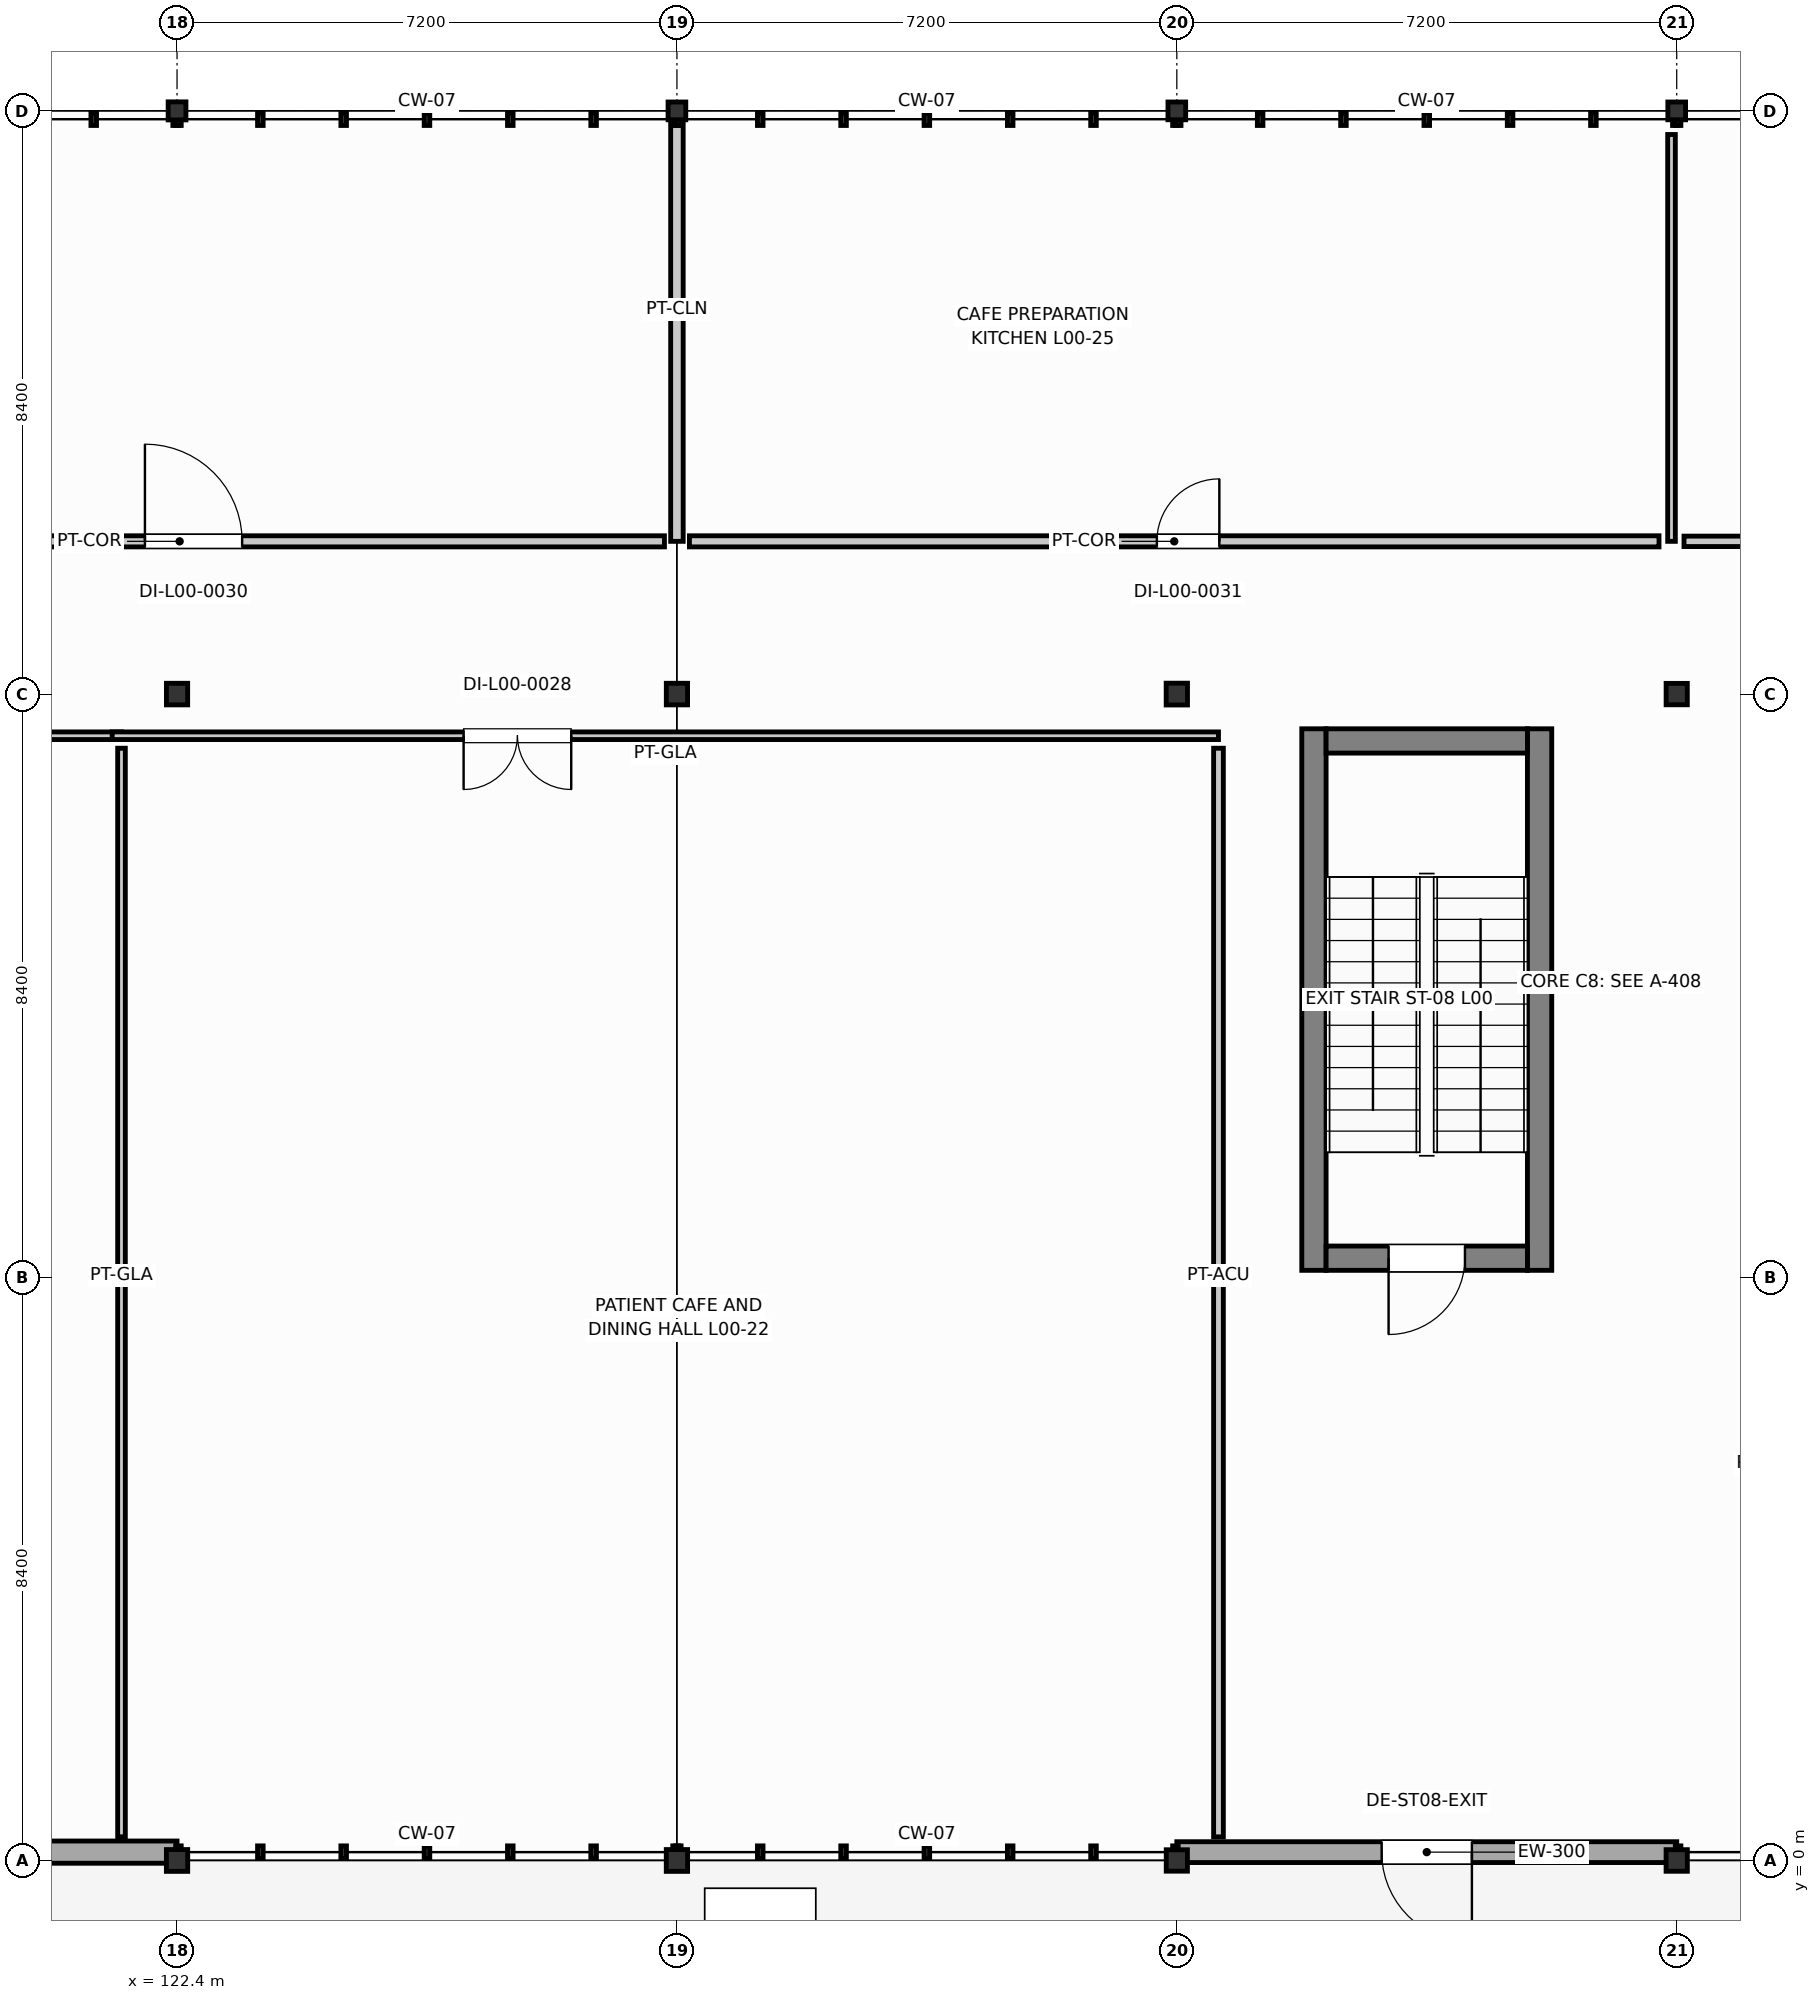
"""IFC4 building model, lengths in metres.
Left out: names, types, materials, properties, quantities, classifications, styles, units other than length and angle.
Written with IfcOpenShell. Run it as: python <this file> out.ifc"""

import sys

from ifc_helpers import new_model, si_unit, direction, frame, frame_2d, origin, origin_2d, place, context, subcontext, project, spatial, rectangle, i_section, extrude, element, fill, save


model = new_model("IFC4")
c1 = context("Model", 3, precision=1e-05, world=origin(), true_north=direction((0.0, 1.0)))
c2 = subcontext(c1, "Body", "Model", "MODEL_VIEW")
j1 = project(units=[si_unit("LENGTHUNIT", "METRE"), si_unit("PLANEANGLEUNIT", "RADIAN")], contexts=[c1])
p1 = place(None, origin())
s1 = spatial("IfcSite", under=j1, at=p1, CompositionType="ELEMENT")
p2 = place(p1, origin())
s2 = spatial("IfcBuilding", under=s1, at=p2, CompositionType="ELEMENT")
p3 = place(p2, origin())
s3 = spatial("IfcBuildingStorey", under=s2, at=p3, CompositionType="ELEMENT", Elevation=0.0)
p4 = place(p3, frame((122.4, 0.0, 0.0), z_axis=(0.0, 0.0, 1.0), x_axis=(1.0, 0.0, 0.0)))
e1 = element("IfcColumn", 1, at=p4, inside=s3, PredefinedType="COLUMN", context=c2, shape_type="SweptSolid", body=[
    extrude(i_section(OverallWidth=0.307, OverallDepth=0.314, WebThickness=0.012, FlangeThickness=0.019, FilletRadius=0.016, at=origin_2d()), origin(), (0.0, 0.0, 1.0), 4.8),
])
p5 = place(p3, frame((122.4, 16.8, 0.0), z_axis=(0.0, 0.0, 1.0), x_axis=(1.0, 0.0, 0.0)))
e2 = element("IfcColumn", 2, at=p5, inside=s3, PredefinedType="COLUMN", context=c2, shape_type="SweptSolid", body=[
    extrude(i_section(OverallWidth=0.306, OverallDepth=0.311, WebThickness=0.011, FlangeThickness=0.017, FilletRadius=0.015, at=origin_2d()), origin(), (0.0, 0.0, 1.0), 4.8),
])
p6 = place(p3, frame((122.4, 25.2, 0.0), z_axis=(0.0, 0.0, 1.0), x_axis=(1.0, 0.0, 0.0)))
e3 = element("IfcColumn", 3, at=p6, inside=s3, PredefinedType="COLUMN", context=c2, shape_type="SweptSolid", body=[
    extrude(i_section(OverallWidth=0.256, OverallDepth=0.26, WebThickness=0.011, FlangeThickness=0.017, FilletRadius=0.013, at=origin_2d()), origin(), (0.0, 0.0, 1.0), 4.8),
])
p7 = place(p3, frame((129.6, 0.0, 0.0), z_axis=(0.0, 0.0, 1.0), x_axis=(1.0, 0.0, 0.0)))
e4 = element("IfcColumn", 4, at=p7, inside=s3, PredefinedType="COLUMN", context=c2, shape_type="SweptSolid", body=[
    extrude(i_section(OverallWidth=0.307, OverallDepth=0.314, WebThickness=0.012, FlangeThickness=0.019, FilletRadius=0.016, at=origin_2d()), origin(), (0.0, 0.0, 1.0), 4.8),
])
p8 = place(p3, frame((129.6, 16.8, 0.0), z_axis=(0.0, 0.0, 1.0), x_axis=(1.0, 0.0, 0.0)))
e5 = element("IfcColumn", 5, at=p8, inside=s3, PredefinedType="COLUMN", context=c2, shape_type="SweptSolid", body=[
    extrude(i_section(OverallWidth=0.306, OverallDepth=0.311, WebThickness=0.011, FlangeThickness=0.017, FilletRadius=0.015, at=origin_2d()), origin(), (0.0, 0.0, 1.0), 4.8),
])
p9 = place(p3, frame((129.6, 25.2, 0.0), z_axis=(0.0, 0.0, 1.0), x_axis=(1.0, 0.0, 0.0)))
e6 = element("IfcColumn", 6, at=p9, inside=s3, PredefinedType="COLUMN", context=c2, shape_type="SweptSolid", body=[
    extrude(i_section(OverallWidth=0.255, OverallDepth=0.256, WebThickness=0.01, FlangeThickness=0.016, FilletRadius=0.013, at=origin_2d()), origin(), (0.0, 0.0, 1.0), 4.8),
])
p10 = place(p3, frame((136.8, 0.0, 0.0), z_axis=(0.0, 0.0, 1.0), x_axis=(1.0, 0.0, 0.0)))
e7 = element("IfcColumn", 7, at=p10, inside=s3, PredefinedType="COLUMN", context=c2, shape_type="SweptSolid", body=[
    extrude(i_section(OverallWidth=0.305, OverallDepth=0.308, WebThickness=0.01, FlangeThickness=0.015, FilletRadius=0.015, at=origin_2d()), origin(), (0.0, 0.0, 1.0), 4.8),
])
p11 = place(p3, frame((136.8, 16.8, 0.0), z_axis=(0.0, 0.0, 1.0), x_axis=(1.0, 0.0, 0.0)))
e8 = element("IfcColumn", 8, at=p11, inside=s3, PredefinedType="COLUMN", context=c2, shape_type="SweptSolid", body=[
    extrude(i_section(OverallWidth=0.307, OverallDepth=0.314, WebThickness=0.012, FlangeThickness=0.019, FilletRadius=0.016, at=origin_2d()), origin(), (0.0, 0.0, 1.0), 4.8),
])
p12 = place(p3, frame((136.8, 25.2, 0.0), z_axis=(0.0, 0.0, 1.0), x_axis=(1.0, 0.0, 0.0)))
e9 = element("IfcColumn", 9, at=p12, inside=s3, PredefinedType="COLUMN", context=c2, shape_type="SweptSolid", body=[
    extrude(i_section(OverallWidth=0.255, OverallDepth=0.256, WebThickness=0.01, FlangeThickness=0.016, FilletRadius=0.013, at=origin_2d()), origin(), (0.0, 0.0, 1.0), 4.8),
])
p13 = place(p3, frame((144.0, 0.0, 0.0), z_axis=(0.0, 0.0, 1.0), x_axis=(1.0, 0.0, 0.0)))
e10 = element("IfcColumn", 10, at=p13, inside=s3, PredefinedType="COLUMN", context=c2, shape_type="SweptSolid", body=[
    extrude(i_section(OverallWidth=0.306, OverallDepth=0.311, WebThickness=0.011, FlangeThickness=0.017, FilletRadius=0.015, at=origin_2d()), origin(), (0.0, 0.0, 1.0), 4.8),
])
p14 = place(p3, frame((144.0, 16.8, 0.0), z_axis=(0.0, 0.0, 1.0), x_axis=(1.0, 0.0, 0.0)))
e11 = element("IfcColumn", 11, at=p14, inside=s3, PredefinedType="COLUMN", context=c2, shape_type="SweptSolid", body=[
    extrude(i_section(OverallWidth=0.305, OverallDepth=0.308, WebThickness=0.01, FlangeThickness=0.015, FilletRadius=0.015, at=origin_2d()), origin(), (0.0, 0.0, 1.0), 4.8),
])
p15 = place(p3, frame((144.0, 25.2, 0.0), z_axis=(0.0, 0.0, 1.0), x_axis=(1.0, 0.0, 0.0)))
e12 = element("IfcColumn", 12, at=p15, inside=s3, PredefinedType="COLUMN", context=c2, shape_type="SweptSolid", body=[
    extrude(i_section(OverallWidth=0.255, OverallDepth=0.256, WebThickness=0.01, FlangeThickness=0.016, FilletRadius=0.013, at=origin_2d()), origin(), (0.0, 0.0, 1.0), 4.8),
])
for number, where, z_axis, x_axis in (
    (13, (138.775, 8.5, 0.0), (0.0, 0.0, 1.0), (0.0, 1.0, 0.0)),
    (14, (142.025, 8.5, 0.0), (0.0, 0.0, 1.0), (0.0, 1.0, 0.0)),
):
    element("IfcWall", number, at=place(p3, frame(where, z_axis=z_axis, x_axis=x_axis)), inside=s3, PredefinedType="SHEAR", context=c2, shape_type="SweptSolid", body=[
        extrude(rectangle(XDim=7.8, YDim=0.35, at=frame_2d((3.9, 0.0))), origin(), (0.0, 0.0, 1.0), 4.58),
    ])
p16 = place(p3, frame((138.95, 16.125, 0.0), z_axis=(0.0, 0.0, 1.0), x_axis=(1.0, 0.0, 0.0)))
e15 = element("IfcWall", 15, at=p16, inside=s3, PredefinedType="SHEAR", context=c2, shape_type="SweptSolid", body=[
    extrude(rectangle(XDim=2.9, YDim=0.35, at=frame_2d((1.45, 0.0))), origin(), (0.0, 0.0, 1.0), 4.58),
])
p17 = place(p3, frame((138.95, 8.675, 0.0), z_axis=(0.0, 0.0, 1.0), x_axis=(1.0, 0.0, 0.0)))
e16 = element("IfcWall", 16, at=p17, inside=s3, PredefinedType="SHEAR", context=c2, shape_type="SweptSolid", body=[
    extrude(rectangle(XDim=2.9, YDim=0.35, at=frame_2d((1.45, 0.0))), origin(), (0.0, 0.0, 1.0), 4.58),
])
p18 = place(p17, frame((0.9, 0.0, 0.0)))
e17 = element("IfcOpeningElement", 17, at=p18, cuts=e16, PredefinedType="OPENING", context=c2, shape_type="SweptSolid", body=[
    extrude(rectangle(XDim=1.1, YDim=2.15, at=frame_2d((0.55, 1.075))), frame((0.0, 0.185, 0.0), z_axis=(0.0, -1.0, 0.0), x_axis=(1.0, 0.0, 0.0)), (0.0, 0.0, 1.0), 0.37),
])
p19 = place(p3, frame((115.2, 0.12, 0.0), z_axis=(0.0, 0.0, 1.0), x_axis=(1.0, 0.0, 0.0)))
e18 = element("IfcWall", 18, at=p19, inside=s3, PredefinedType="SOLIDWALL", context=c2, shape_type="SweptSolid", body=[
    extrude(rectangle(XDim=7.2, YDim=0.32, at=frame_2d((3.6, 0.0))), origin(), (0.0, 0.0, 1.0), 4.082),
])
p20 = place(p19, frame((2.7, 0.0, 0.0)))
e19 = element("IfcOpeningElement", 19, at=p20, cuts=e18, PredefinedType="OPENING", context=c2, shape_type="SweptSolid", body=[
    extrude(rectangle(XDim=1.8, YDim=2.2, at=frame_2d((0.9, 1.1))), frame((0.0, 0.17, 0.0), z_axis=(0.0, -1.0, 0.0), x_axis=(1.0, 0.0, 0.0)), (0.0, 0.0, 1.0), 0.34),
])
p21 = place(p3, frame((136.8, 0.12, 0.0), z_axis=(0.0, 0.0, 1.0), x_axis=(1.0, 0.0, 0.0)))
e20 = element("IfcWall", 20, at=p21, inside=s3, PredefinedType="SOLIDWALL", context=c2, shape_type="SweptSolid", body=[
    extrude(rectangle(XDim=7.2, YDim=0.3, at=frame_2d((3.6, 0.0))), origin(), (0.0, 0.0, 1.0), 4.082),
])
p22 = place(p21, frame((2.95, 0.0, 0.0)))
e21 = element("IfcOpeningElement", 21, at=p22, cuts=e20, PredefinedType="OPENING", context=c2, shape_type="SweptSolid", body=[
    extrude(rectangle(XDim=1.3, YDim=2.2, at=frame_2d((0.65, 1.1))), frame((0.0, 0.16, 0.0), z_axis=(0.0, -1.0, 0.0), x_axis=(1.0, 0.0, 0.0)), (0.0, 0.0, 1.0), 0.32),
])
p23 = place(p3, frame((101.14, 16.2, 0.0), z_axis=(0.0, 0.0, 1.0), x_axis=(1.0, 0.0, 0.0)))
e22 = element("IfcWall", 22, at=p23, inside=s3, PredefinedType="MOVABLE", context=c2, shape_type="SweptSolid", body=[
    extrude(rectangle(XDim=20.46, YDim=0.11, at=frame_2d((10.23, 0.0))), origin(), (0.0, 0.0, 1.0), 3.618),
])
p24 = place(p23, frame((9.525, 0.0, 0.0)))
e23 = element("IfcOpeningElement", 23, at=p24, cuts=e22, PredefinedType="OPENING", context=c2, shape_type="SweptSolid", body=[
    extrude(rectangle(XDim=1.55, YDim=2.2, at=frame_2d((0.775, 1.1))), frame((0.0, 0.065, 0.0), z_axis=(0.0, -1.0, 0.0), x_axis=(1.0, 0.0, 0.0)), (0.0, 0.0, 1.0), 0.13),
])
p25 = place(p3, frame((121.6, 16.02, 0.0), z_axis=(0.0, 0.0, 1.0), x_axis=(0.0, -1.0, 0.0)))
e24 = element("IfcWall", 24, at=p25, inside=s3, PredefinedType="MOVABLE", context=c2, shape_type="SweptSolid", body=[
    extrude(rectangle(XDim=15.68, YDim=0.11, at=frame_2d((7.84, 0.0))), origin(), (0.0, 0.0, 1.0), 4.545),
])
p26 = place(p3, frame((121.465, 16.2, 0.0), z_axis=(0.0, 0.0, 1.0), x_axis=(1.0, 0.0, 0.0)))
e25 = element("IfcWall", 25, at=p26, inside=s3, PredefinedType="MOVABLE", context=c2, shape_type="SweptSolid", body=[
    extrude(rectangle(XDim=15.935, YDim=0.11, at=frame_2d((7.967, 0.0))), origin(), (0.0, 0.0, 1.0), 3.618),
])
p27 = place(p26, frame((5.062, 0.0, 0.0)))
e26 = element("IfcOpeningElement", 26, at=p27, cuts=e25, PredefinedType="OPENING", context=c2, shape_type="SweptSolid", body=[
    extrude(rectangle(XDim=1.55, YDim=2.2, at=frame_2d((0.775, 1.1))), frame((0.0, 0.065, 0.0), z_axis=(0.0, -1.0, 0.0), x_axis=(1.0, 0.0, 0.0)), (0.0, 0.0, 1.0), 0.13),
])
p28 = place(p3, frame((137.4, 16.02, 0.0), z_axis=(0.0, 0.0, 1.0), x_axis=(0.0, -1.0, 0.0)))
e27 = element("IfcWall", 27, at=p28, inside=s3, PredefinedType="PARTITIONING", context=c2, shape_type="SweptSolid", body=[
    extrude(rectangle(XDim=15.68, YDim=0.14, at=frame_2d((7.84, 0.0))), origin(), (0.0, 0.0, 1.0), 4.545),
])
p29 = place(p3, frame((129.6, 25.19, 0.0), z_axis=(0.0, 0.0, 1.0), x_axis=(0.0, -1.0, 0.0)))
e28 = element("IfcWall", 28, at=p29, inside=s3, PredefinedType="PARTITIONING", context=c2, shape_type="SweptSolid", body=[
    extrude(rectangle(XDim=6.19, YDim=0.18, at=frame_2d((3.095, 0.0))), origin(), (0.0, 0.0, 1.0), 3.775),
])
p30 = place(p3, frame((129.42, 19.0, 0.0), z_axis=(0.0, 0.0, 1.0), x_axis=(-1.0, 0.0, 0.0)))
e29 = element("IfcWall", 29, at=p30, inside=s3, PredefinedType="PARTITIONING", context=c2, shape_type="SweptSolid", body=[
    extrude(rectangle(XDim=13.965, YDim=0.16, at=frame_2d((6.982, 0.0))), origin(), (0.0, 0.0, 1.0), 3.775),
])
p31 = place(p30, frame((6.083, 0.0, 0.0)))
e30 = element("IfcOpeningElement", 30, at=p31, cuts=e29, PredefinedType="OPENING", context=c2, shape_type="SweptSolid", body=[
    extrude(rectangle(XDim=1.4, YDim=2.2, at=frame_2d((0.7, 1.1))), frame((0.0, 0.09, 0.0), z_axis=(0.0, -1.0, 0.0), x_axis=(1.0, 0.0, 0.0)), (0.0, 0.0, 1.0), 0.18),
])
p32 = place(p3, frame((143.925, 24.86, 0.0), z_axis=(0.0, 0.0, 1.0), x_axis=(0.0, -1.0, 0.0)))
e31 = element("IfcWall", 31, at=p32, inside=s3, PredefinedType="MOVABLE", context=c2, shape_type="SweptSolid", body=[
    extrude(rectangle(XDim=5.86, YDim=0.11, at=frame_2d((2.93, 0.0))), origin(), (0.0, 0.0, 1.0), 3.928),
])
p33 = place(p3, frame((143.745, 19.0, 0.0), z_axis=(0.0, 0.0, 1.0), x_axis=(-1.0, 0.0, 0.0)))
e32 = element("IfcWall", 32, at=p33, inside=s3, PredefinedType="PARTITIONING", context=c2, shape_type="SweptSolid", body=[
    extrude(rectangle(XDim=13.965, YDim=0.16, at=frame_2d((6.982, 0.0))), origin(), (0.0, 0.0, 1.0), 3.775),
])
p34 = place(p33, frame((6.333, 0.0, 0.0)))
e33 = element("IfcOpeningElement", 33, at=p34, cuts=e32, PredefinedType="OPENING", context=c2, shape_type="SweptSolid", body=[
    extrude(rectangle(XDim=0.9, YDim=2.04, at=frame_2d((0.45, 1.02))), frame((0.0, 0.09, 0.0), z_axis=(0.0, -1.0, 0.0), x_axis=(1.0, 0.0, 0.0)), (0.0, 0.0, 1.0), 0.18),
])
p35 = place(p3, frame((158.06, 19.0, 0.0), z_axis=(0.0, 0.0, 1.0), x_axis=(-1.0, 0.0, 0.0)))
e34 = element("IfcWall", 34, at=p35, inside=s3, PredefinedType="PLUMBINGWALL", context=c2, shape_type="SweptSolid", body=[
    extrude(rectangle(XDim=13.955, YDim=0.15, at=frame_2d((6.978, 0.0))), origin(), (0.0, 0.0, 1.0), 3.928),
])
p36 = place(p35, frame((6.877, 0.0, 0.0)))
e35 = element("IfcOpeningElement", 35, at=p36, cuts=e34, PredefinedType="OPENING", context=c2, shape_type="SweptSolid", body=[
    extrude(rectangle(XDim=1.0, YDim=2.1, at=frame_2d((0.5, 1.05))), frame((0.0, 0.085, 0.0), z_axis=(0.0, -1.0, 0.0), x_axis=(1.0, 0.0, 0.0)), (0.0, 0.0, 1.0), 0.17),
])
p37 = place(p18, frame((1.1, 0.0, 0.0), z_axis=(0.0, 0.0, 1.0), x_axis=(-1.0, 0.0, 0.0)))
e36 = element("IfcDoor", 36, at=p37, inside=s3, OperationType="SINGLE_SWING_RIGHT", PredefinedType="DOOR", context=c2, shape_type="SweptSolid", body=[
    extrude(rectangle(XDim=1.1, YDim=2.15, at=frame_2d((0.55, 1.075))), frame((0.0, 0.025, 0.0), z_axis=(0.0, -1.0, 0.0), x_axis=(1.0, 0.0, 0.0)), (0.0, 0.0, 1.0), 0.05),
])
fill(e17, e36)
p38 = place(p22, frame((1.3, 0.0, 0.0), z_axis=(0.0, 0.0, 1.0), x_axis=(-1.0, 0.0, 0.0)))
e37 = element("IfcDoor", 37, at=p38, inside=s3, OperationType="SINGLE_SWING_LEFT", PredefinedType="DOOR", context=c2, shape_type="SweptSolid", body=[
    extrude(rectangle(XDim=1.3, YDim=2.2, at=frame_2d((0.65, 1.1))), frame((0.0, 0.025, 0.0), z_axis=(0.0, -1.0, 0.0), x_axis=(1.0, 0.0, 0.0)), (0.0, 0.0, 1.0), 0.05),
])
fill(e21, e37)
p39 = place(p27, frame((1.55, 0.0, 0.0), z_axis=(0.0, 0.0, 1.0), x_axis=(-1.0, 0.0, 0.0)))
e38 = element("IfcDoor", 38, at=p39, inside=s3, OperationType="DOUBLE_DOOR_SINGLE_SWING", PredefinedType="DOOR", context=c2, shape_type="SweptSolid", body=[
    extrude(rectangle(XDim=1.55, YDim=2.2, at=frame_2d((0.775, 1.1))), frame((0.0, 0.025, 0.0), z_axis=(0.0, -1.0, 0.0), x_axis=(1.0, 0.0, 0.0)), (0.0, 0.0, 1.0), 0.05),
])
fill(e26, e38)
p40 = place(p31, frame((1.4, 0.0, 0.0), z_axis=(0.0, 0.0, 1.0), x_axis=(-1.0, 0.0, 0.0)))
e39 = element("IfcDoor", 39, at=p40, inside=s3, OperationType="SINGLE_SWING_LEFT", PredefinedType="DOOR", context=c2, shape_type="SweptSolid", body=[
    extrude(rectangle(XDim=1.4, YDim=2.2, at=frame_2d((0.7, 1.1))), frame((0.0, 0.025, 0.0), z_axis=(0.0, -1.0, 0.0), x_axis=(1.0, 0.0, 0.0)), (0.0, 0.0, 1.0), 0.05),
])
fill(e30, e39)
p41 = place(p34, frame((0.9, 0.0, 0.0), z_axis=(0.0, 0.0, 1.0), x_axis=(-1.0, 0.0, 0.0)))
e40 = element("IfcDoor", 40, at=p41, inside=s3, OperationType="SINGLE_SWING_RIGHT", PredefinedType="DOOR", context=c2, shape_type="SweptSolid", body=[
    extrude(rectangle(XDim=0.9, YDim=2.04, at=frame_2d((0.45, 1.02))), frame((0.0, 0.025, 0.0), z_axis=(0.0, -1.0, 0.0), x_axis=(1.0, 0.0, 0.0)), (0.0, 0.0, 1.0), 0.05),
])
fill(e33, e40)
save(model, sys.argv[1])
